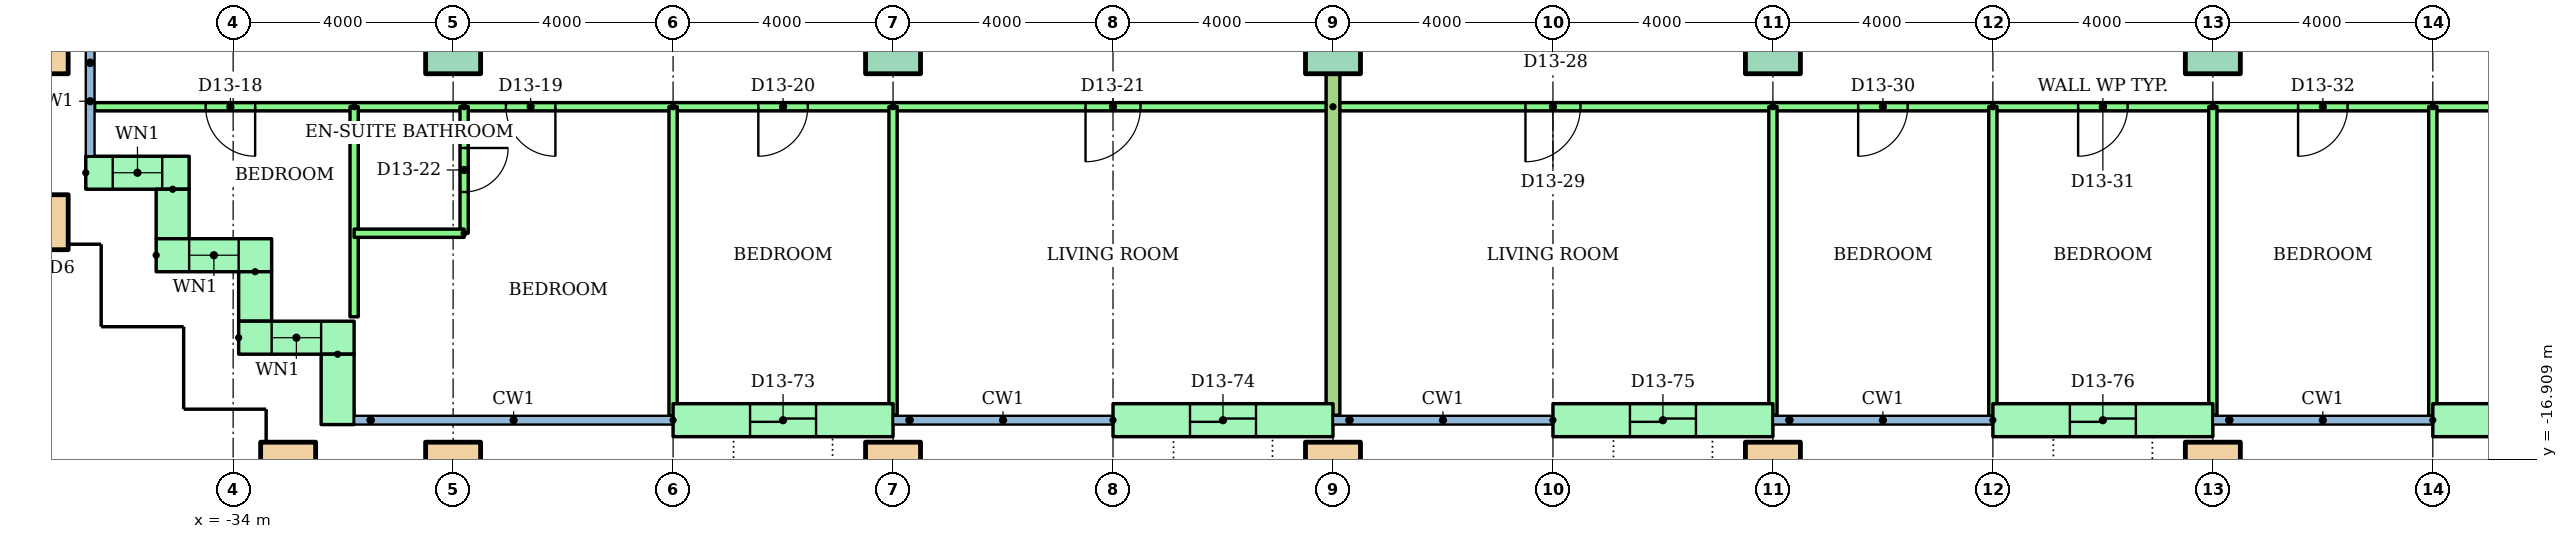
"""IFC4 building model, lengths in metres.
Left out: names, types, materials, properties, quantities, classifications, styles, units other than length and angle.
Written with IfcOpenShell. Run it as: python <this file> out.ifc"""

import sys

from ifc_helpers import new_model, si_unit, direction, frame, frame_2d, origin, origin_2d, place, context, subcontext, project, spatial, rectangle, hollow_rectangle, extrude, element, fill, save


model = new_model("IFC4")
c1 = context("Model", 3, precision=1e-05, world=origin(), true_north=direction((0.0, 1.0)))
c2 = subcontext(c1, "Body", "Model", "MODEL_VIEW")
j1 = project(units=[si_unit("LENGTHUNIT", "METRE"), si_unit("PLANEANGLEUNIT", "RADIAN")], contexts=[c1])
p1 = place(None, origin())
s1 = spatial("IfcSite", under=j1, at=p1, CompositionType="ELEMENT")
p2 = place(p1, origin())
s2 = spatial("IfcBuilding", under=s1, at=p2, CompositionType="ELEMENT")
p3 = place(p2, frame((0.0, 0.0, 51.2)))
s3 = spatial("IfcBuildingStorey", under=s2, at=p3, CompositionType="ELEMENT", Elevation=51.2)
for number, where in (
    (1, (-33.0, -17.1, 0.0)),
    (2, (-30.0, -17.1, 0.0)),
    (3, (-22.0, -17.1, 0.0)),
    (4, (-14.0, -17.1, 0.0)),
    (5, (-6.0, -17.1, 0.0)),
    (6, (2.0, -17.1, 0.0)),
    (7, (-37.5, -12.6, 0.0)),
    (8, (-37.5, -9.4, 0.0)),
):
    element("IfcColumn", number, at=place(p3, frame(where)), inside=s3, PredefinedType="COLUMN", context=c2, shape_type="SweptSolid", body=[
        extrude(hollow_rectangle(XDim=1.0, YDim=1.0, WallThickness=0.05, at=origin_2d()), origin(), (0.0, 0.0, 1.0), 3.2),
    ])
for number, where in (
    (9, (-30.0, -9.4, 0.0)),
    (10, (-22.0, -9.4, 0.0)),
    (11, (-14.0, -9.4, 0.0)),
    (12, (-6.0, -9.4, 0.0)),
    (13, (2.0, -9.4, 0.0)),
):
    element("IfcColumn", number, at=place(p3, frame(where)), inside=s3, PredefinedType="COLUMN", context=c2, shape_type="SweptSolid", body=[
        extrude(rectangle(XDim=1.0, YDim=1.0, at=origin_2d()), origin(), (0.0, 0.0, 1.0), 3.2),
    ])
p4 = place(p3, frame((-36.68, -11.7, 0.0)))
e14 = element("IfcWall", 14, at=p4, inside=s3, PredefinedType="STANDARD", context=c2, shape_type="SweptSolid", body=[
    extrude(rectangle(XDim=1.88, YDim=0.6, at=frame_2d((0.94, 0.0))), origin(), (0.0, 0.0, 1.0), 2.92),
])
p5 = place(p4, frame((0.49, 0.0, 0.9)))
e15 = element("IfcOpeningElement", 15, at=p5, cuts=e14, PredefinedType="OPENING", context=c2, shape_type="SweptSolid", body=[
    extrude(rectangle(XDim=0.9, YDim=1.5, at=frame_2d((0.45, 0.75))), frame((0.0, 0.31, 0.0), z_axis=(0.0, -1.0, 0.0), x_axis=(1.0, 0.0, 0.0)), (0.0, 0.0, 1.0), 0.62),
])
p6 = place(p3, frame((-35.1, -12.0, 0.0), z_axis=(0.0, 0.0, 1.0), x_axis=(0.0, -1.0, 0.0)))
e16 = element("IfcWall", 16, at=p6, inside=s3, PredefinedType="STANDARD", context=c2, shape_type="SweptSolid", body=[
    extrude(rectangle(XDim=0.9, YDim=0.6, at=frame_2d((0.45, 0.0))), origin(), (0.0, 0.0, 1.0), 2.92),
])
p7 = place(p3, frame((-35.4, -13.2, 0.0)))
e17 = element("IfcWall", 17, at=p7, inside=s3, PredefinedType="STANDARD", context=c2, shape_type="SweptSolid", body=[
    extrude(rectangle(XDim=2.1, YDim=0.6, at=frame_2d((1.05, 0.0))), origin(), (0.0, 0.0, 1.0), 2.92),
])
p8 = place(p7, frame((0.6, 0.0, 0.9)))
e18 = element("IfcOpeningElement", 18, at=p8, cuts=e17, PredefinedType="OPENING", context=c2, shape_type="SweptSolid", body=[
    extrude(rectangle(XDim=0.9, YDim=1.5, at=frame_2d((0.45, 0.75))), frame((0.0, 0.31, 0.0), z_axis=(0.0, -1.0, 0.0), x_axis=(1.0, 0.0, 0.0)), (0.0, 0.0, 1.0), 0.62),
])
p9 = place(p3, frame((-33.6, -13.5, 0.0), z_axis=(0.0, 0.0, 1.0), x_axis=(0.0, -1.0, 0.0)))
e19 = element("IfcWall", 19, at=p9, inside=s3, PredefinedType="STANDARD", context=c2, shape_type="SweptSolid", body=[
    extrude(rectangle(XDim=0.9, YDim=0.6, at=frame_2d((0.45, 0.0))), origin(), (0.0, 0.0, 1.0), 2.92),
])
p10 = place(p3, frame((-33.9, -14.7, 0.0)))
e20 = element("IfcWall", 20, at=p10, inside=s3, PredefinedType="STANDARD", context=c2, shape_type="SweptSolid", body=[
    extrude(rectangle(XDim=2.1, YDim=0.6, at=frame_2d((1.05, 0.0))), origin(), (0.0, 0.0, 1.0), 2.92),
])
p11 = place(p10, frame((0.6, 0.0, 0.9)))
e21 = element("IfcOpeningElement", 21, at=p11, cuts=e20, PredefinedType="OPENING", context=c2, shape_type="SweptSolid", body=[
    extrude(rectangle(XDim=0.9, YDim=1.5, at=frame_2d((0.45, 0.75))), frame((0.0, 0.31, 0.0), z_axis=(0.0, -1.0, 0.0), x_axis=(1.0, 0.0, 0.0)), (0.0, 0.0, 1.0), 0.62),
])
p12 = place(p3, frame((-32.1, -15.0, 0.0), z_axis=(0.0, 0.0, 1.0), x_axis=(0.0, -1.0, 0.0)))
e22 = element("IfcWall", 22, at=p12, inside=s3, PredefinedType="STANDARD", context=c2, shape_type="SweptSolid", body=[
    extrude(rectangle(XDim=1.28, YDim=0.6, at=frame_2d((0.64, 0.0))), origin(), (0.0, 0.0, 1.0), 2.92),
])
p13 = place(p3, frame((-26.0, -16.2, 0.0)))
e23 = element("IfcWall", 23, at=p13, inside=s3, PredefinedType="STANDARD", context=c2, shape_type="SweptSolid", body=[
    extrude(rectangle(XDim=4.0, YDim=0.6, at=frame_2d((2.0, 0.0))), origin(), (0.0, 0.0, 1.0), 2.92),
])
p14 = place(p13, frame((1.4, 0.0, 0.0)))
e24 = element("IfcOpeningElement", 24, at=p14, cuts=e23, PredefinedType="OPENING", context=c2, shape_type="SweptSolid", body=[
    extrude(rectangle(XDim=1.2, YDim=2.1, at=frame_2d((0.6, 1.05))), frame((0.0, 0.31, 0.0), z_axis=(0.0, -1.0, 0.0), x_axis=(1.0, 0.0, 0.0)), (0.0, 0.0, 1.0), 0.62),
])
p15 = place(p3, frame((-18.0, -16.2, 0.0)))
e25 = element("IfcWall", 25, at=p15, inside=s3, PredefinedType="STANDARD", context=c2, shape_type="SweptSolid", body=[
    extrude(rectangle(XDim=4.0, YDim=0.6, at=frame_2d((2.0, 0.0))), origin(), (0.0, 0.0, 1.0), 2.92),
])
p16 = place(p15, frame((1.4, 0.0, 0.0)))
e26 = element("IfcOpeningElement", 26, at=p16, cuts=e25, PredefinedType="OPENING", context=c2, shape_type="SweptSolid", body=[
    extrude(rectangle(XDim=1.2, YDim=2.1, at=frame_2d((0.6, 1.05))), frame((0.0, 0.31, 0.0), z_axis=(0.0, -1.0, 0.0), x_axis=(1.0, 0.0, 0.0)), (0.0, 0.0, 1.0), 0.62),
])
p17 = place(p3, frame((-10.0, -16.2, 0.0)))
e27 = element("IfcWall", 27, at=p17, inside=s3, PredefinedType="STANDARD", context=c2, shape_type="SweptSolid", body=[
    extrude(rectangle(XDim=4.0, YDim=0.6, at=frame_2d((2.0, 0.0))), origin(), (0.0, 0.0, 1.0), 2.92),
])
p18 = place(p17, frame((1.4, 0.0, 0.0)))
e28 = element("IfcOpeningElement", 28, at=p18, cuts=e27, PredefinedType="OPENING", context=c2, shape_type="SweptSolid", body=[
    extrude(rectangle(XDim=1.2, YDim=2.1, at=frame_2d((0.6, 1.05))), frame((0.0, 0.31, 0.0), z_axis=(0.0, -1.0, 0.0), x_axis=(1.0, 0.0, 0.0)), (0.0, 0.0, 1.0), 0.62),
])
p19 = place(p3, frame((-2.0, -16.2, 0.0)))
e29 = element("IfcWall", 29, at=p19, inside=s3, PredefinedType="STANDARD", context=c2, shape_type="SweptSolid", body=[
    extrude(rectangle(XDim=4.0, YDim=0.6, at=frame_2d((2.0, 0.0))), origin(), (0.0, 0.0, 1.0), 2.92),
])
p20 = place(p19, frame((1.4, 0.0, 0.0)))
e30 = element("IfcOpeningElement", 30, at=p20, cuts=e29, PredefinedType="OPENING", context=c2, shape_type="SweptSolid", body=[
    extrude(rectangle(XDim=1.2, YDim=2.1, at=frame_2d((0.6, 1.05))), frame((0.0, 0.31, 0.0), z_axis=(0.0, -1.0, 0.0), x_axis=(1.0, 0.0, 0.0)), (0.0, 0.0, 1.0), 0.62),
])
p21 = place(p3, frame((6.0, -16.2, 0.0)))
e31 = element("IfcWall", 31, at=p21, inside=s3, PredefinedType="STANDARD", context=c2, shape_type="SweptSolid", body=[
    extrude(rectangle(XDim=4.0, YDim=0.6, at=frame_2d((2.0, 0.0))), origin(), (0.0, 0.0, 1.0), 2.92),
])
p22 = place(p21, frame((1.4, 0.0, 0.0)))
e32 = element("IfcOpeningElement", 32, at=p22, cuts=e31, PredefinedType="OPENING", context=c2, shape_type="SweptSolid", body=[
    extrude(rectangle(XDim=1.2, YDim=2.1, at=frame_2d((0.6, 1.05))), frame((0.0, 0.31, 0.0), z_axis=(0.0, -1.0, 0.0), x_axis=(1.0, 0.0, 0.0)), (0.0, 0.0, 1.0), 0.62),
])
p23 = place(p3, frame((-14.0, -10.5, 0.0), z_axis=(0.0, 0.0, 1.0), x_axis=(-1.0, 0.0, 0.0)))
e33 = element("IfcWall", 33, at=p23, inside=s3, PredefinedType="PARTITIONING", context=c2, shape_type="SweptSolid", body=[
    extrude(rectangle(XDim=22.52, YDim=0.15, at=frame_2d((11.26, 0.0))), origin(), (0.0, 0.0, 1.0), 2.4),
])
p24 = place(p23, frame((19.6, 0.0, 0.0)))
e34 = element("IfcOpeningElement", 34, at=p24, cuts=e33, PredefinedType="OPENING", context=c2, shape_type="SweptSolid", body=[
    extrude(rectangle(XDim=0.9, YDim=2.1, at=frame_2d((0.45, 1.05))), frame((0.0, 0.085, 0.0), z_axis=(0.0, -1.0, 0.0), x_axis=(1.0, 0.0, 0.0)), (0.0, 0.0, 1.0), 0.17),
])
p25 = place(p23, frame((14.14, 0.0, 0.0)))
e35 = element("IfcOpeningElement", 35, at=p25, cuts=e33, PredefinedType="OPENING", context=c2, shape_type="SweptSolid", body=[
    extrude(rectangle(XDim=0.9, YDim=2.1, at=frame_2d((0.45, 1.05))), frame((0.0, 0.085, 0.0), z_axis=(0.0, -1.0, 0.0), x_axis=(1.0, 0.0, 0.0)), (0.0, 0.0, 1.0), 0.17),
])
p26 = place(p23, frame((9.55, 0.0, 0.0)))
e36 = element("IfcOpeningElement", 36, at=p26, cuts=e33, PredefinedType="OPENING", context=c2, shape_type="SweptSolid", body=[
    extrude(rectangle(XDim=0.9, YDim=2.1, at=frame_2d((0.45, 1.05))), frame((0.0, 0.085, 0.0), z_axis=(0.0, -1.0, 0.0), x_axis=(1.0, 0.0, 0.0)), (0.0, 0.0, 1.0), 0.17),
])
p27 = place(p23, frame((3.5, 0.0, 0.0)))
e37 = element("IfcOpeningElement", 37, at=p27, cuts=e33, PredefinedType="OPENING", context=c2, shape_type="SweptSolid", body=[
    extrude(rectangle(XDim=1.0, YDim=2.1, at=frame_2d((0.5, 1.05))), frame((0.0, 0.085, 0.0), z_axis=(0.0, -1.0, 0.0), x_axis=(1.0, 0.0, 0.0)), (0.0, 0.0, 1.0), 0.17),
])
p28 = place(p3, frame((-31.8, -10.5, 0.0), z_axis=(0.0, 0.0, 1.0), x_axis=(0.0, -1.0, 0.0)))
e38 = element("IfcWall", 38, at=p28, inside=s3, PredefinedType="PARTITIONING", context=c2, shape_type="SweptSolid", body=[
    extrude(rectangle(XDim=3.82, YDim=0.15, at=frame_2d((1.91, 0.0))), origin(), (0.0, 0.0, 1.0), 2.4),
])
p29 = place(p3, frame((-26.0, -10.5, 0.0), z_axis=(0.0, 0.0, 1.0), x_axis=(0.0, -1.0, 0.0)))
e39 = element("IfcWall", 39, at=p29, inside=s3, PredefinedType="PARTITIONING", context=c2, shape_type="SweptSolid", body=[
    extrude(rectangle(XDim=5.621, YDim=0.15, at=frame_2d((2.811, 0.0))), origin(), (0.0, 0.0, 1.0), 2.4),
])
p30 = place(p3, frame((-22.0, -10.5, 0.0), z_axis=(0.0, 0.0, 1.0), x_axis=(0.0, -1.0, 0.0)))
e40 = element("IfcWall", 40, at=p30, inside=s3, PredefinedType="PARTITIONING", context=c2, shape_type="SweptSolid", body=[
    extrude(rectangle(XDim=5.61, YDim=0.15, at=frame_2d((2.805, 0.0))), origin(), (0.0, 0.0, 1.0), 2.4),
])
p31 = place(p3, frame((-29.8, -10.5, 0.0), z_axis=(0.0, 0.0, 1.0), x_axis=(0.0, -1.0, 0.0)))
e41 = element("IfcWall", 41, at=p31, inside=s3, PredefinedType="PARTITIONING", context=c2, shape_type="SweptSolid", body=[
    extrude(rectangle(XDim=2.3, YDim=0.15, at=frame_2d((1.15, 0.0))), origin(), (0.0, 0.0, 1.0), 2.4),
])
p32 = place(p31, frame((0.75, 0.0, 0.0)))
e42 = element("IfcOpeningElement", 42, at=p32, cuts=e41, PredefinedType="OPENING", context=c2, shape_type="SweptSolid", body=[
    extrude(rectangle(XDim=0.8, YDim=2.1, at=frame_2d((0.4, 1.05))), frame((0.0, 0.085, 0.0), z_axis=(0.0, -1.0, 0.0), x_axis=(1.0, 0.0, 0.0)), (0.0, 0.0, 1.0), 0.17),
])
p33 = place(p3, frame((-29.8, -12.8, 0.0), z_axis=(0.0, 0.0, 1.0), x_axis=(-1.0, 0.0, 0.0)))
e43 = element("IfcWall", 43, at=p33, inside=s3, PredefinedType="PARTITIONING", context=c2, shape_type="SweptSolid", body=[
    extrude(rectangle(XDim=2.0, YDim=0.15, at=frame_2d((1.0, 0.0))), origin(), (0.0, 0.0, 1.0), 2.4),
])
p34 = place(p3, frame((10.0, -10.5, 0.0), z_axis=(0.0, 0.0, 1.0), x_axis=(-1.0, 0.0, 0.0)))
e44 = element("IfcWall", 44, at=p34, inside=s3, PredefinedType="PARTITIONING", context=c2, shape_type="SweptSolid", body=[
    extrude(rectangle(XDim=24.0, YDim=0.15, at=frame_2d((12.0, 0.0))), origin(), (0.0, 0.0, 1.0), 2.4),
])
p35 = place(p34, frame((19.5, 0.0, 0.0)))
e45 = element("IfcOpeningElement", 45, at=p35, cuts=e44, PredefinedType="OPENING", context=c2, shape_type="SweptSolid", body=[
    extrude(rectangle(XDim=1.0, YDim=2.1, at=frame_2d((0.5, 1.05))), frame((0.0, 0.085, 0.0), z_axis=(0.0, -1.0, 0.0), x_axis=(1.0, 0.0, 0.0)), (0.0, 0.0, 1.0), 0.17),
])
p36 = place(p34, frame((13.55, 0.0, 0.0)))
e46 = element("IfcOpeningElement", 46, at=p36, cuts=e44, PredefinedType="OPENING", context=c2, shape_type="SweptSolid", body=[
    extrude(rectangle(XDim=0.9, YDim=2.1, at=frame_2d((0.45, 1.05))), frame((0.0, 0.085, 0.0), z_axis=(0.0, -1.0, 0.0), x_axis=(1.0, 0.0, 0.0)), (0.0, 0.0, 1.0), 0.17),
])
p37 = place(p34, frame((9.55, 0.0, 0.0)))
e47 = element("IfcOpeningElement", 47, at=p37, cuts=e44, PredefinedType="OPENING", context=c2, shape_type="SweptSolid", body=[
    extrude(rectangle(XDim=0.9, YDim=2.1, at=frame_2d((0.45, 1.05))), frame((0.0, 0.085, 0.0), z_axis=(0.0, -1.0, 0.0), x_axis=(1.0, 0.0, 0.0)), (0.0, 0.0, 1.0), 0.17),
])
p38 = place(p34, frame((5.55, 0.0, 0.0)))
e48 = element("IfcOpeningElement", 48, at=p38, cuts=e44, PredefinedType="OPENING", context=c2, shape_type="SweptSolid", body=[
    extrude(rectangle(XDim=0.9, YDim=2.1, at=frame_2d((0.45, 1.05))), frame((0.0, 0.085, 0.0), z_axis=(0.0, -1.0, 0.0), x_axis=(1.0, 0.0, 0.0)), (0.0, 0.0, 1.0), 0.17),
])
p39 = place(p34, frame((1.55, 0.0, 0.0)))
e49 = element("IfcOpeningElement", 49, at=p39, cuts=e44, PredefinedType="OPENING", context=c2, shape_type="SweptSolid", body=[
    extrude(rectangle(XDim=0.9, YDim=2.1, at=frame_2d((0.45, 1.05))), frame((0.0, 0.085, 0.0), z_axis=(0.0, -1.0, 0.0), x_axis=(1.0, 0.0, 0.0)), (0.0, 0.0, 1.0), 0.17),
])
p40 = place(p3, frame((-6.0, -10.5, 0.0), z_axis=(0.0, 0.0, 1.0), x_axis=(0.0, -1.0, 0.0)))
e50 = element("IfcWall", 50, at=p40, inside=s3, PredefinedType="PARTITIONING", context=c2, shape_type="SweptSolid", body=[
    extrude(rectangle(XDim=5.61, YDim=0.15, at=frame_2d((2.805, 0.0))), origin(), (0.0, 0.0, 1.0), 2.4),
])
p41 = place(p3, frame((-2.0, -10.5, 0.0), z_axis=(0.0, 0.0, 1.0), x_axis=(0.0, -1.0, 0.0)))
e51 = element("IfcWall", 51, at=p41, inside=s3, PredefinedType="PARTITIONING", context=c2, shape_type="SweptSolid", body=[
    extrude(rectangle(XDim=5.621, YDim=0.15, at=frame_2d((2.811, 0.0))), origin(), (0.0, 0.0, 1.0), 2.4),
])
p42 = place(p3, frame((2.0, -10.5, 0.0), z_axis=(0.0, 0.0, 1.0), x_axis=(0.0, -1.0, 0.0)))
e52 = element("IfcWall", 52, at=p42, inside=s3, PredefinedType="PARTITIONING", context=c2, shape_type="SweptSolid", body=[
    extrude(rectangle(XDim=5.61, YDim=0.15, at=frame_2d((2.805, 0.0))), origin(), (0.0, 0.0, 1.0), 2.4),
])
p43 = place(p3, frame((6.0, -10.5, 0.0), z_axis=(0.0, 0.0, 1.0), x_axis=(0.0, -1.0, 0.0)))
e53 = element("IfcWall", 53, at=p43, inside=s3, PredefinedType="PARTITIONING", context=c2, shape_type="SweptSolid", body=[
    extrude(rectangle(XDim=5.621, YDim=0.15, at=frame_2d((2.811, 0.0))), origin(), (0.0, 0.0, 1.0), 2.4),
])
p44 = place(p3, frame((-14.0, -1.4, 0.0), z_axis=(0.0, 0.0, 1.0), x_axis=(0.0, -1.0, 0.0)))
e54 = element("IfcWall", 54, at=p44, inside=s3, PredefinedType="PARTITIONING", context=c2, shape_type="SweptSolid", body=[
    extrude(rectangle(XDim=14.71, YDim=0.25, at=frame_2d((7.355, 0.0))), origin(), (0.0, 0.0, 1.0), 2.4),
])
p45 = place(p5, origin())
e55 = element("IfcWindow", 55, at=p45, inside=s3, PartitioningType="SINGLE_PANEL", PredefinedType="WINDOW", context=c2, shape_type="SweptSolid", body=[
    extrude(rectangle(XDim=0.9, YDim=1.5, at=frame_2d((0.45, 0.75))), frame((0.0, 0.03, 0.0), z_axis=(0.0, -1.0, 0.0), x_axis=(1.0, 0.0, 0.0)), (0.0, 0.0, 1.0), 0.06),
])
fill(e15, e55)
p46 = place(p8, origin())
e56 = element("IfcWindow", 56, at=p46, inside=s3, PartitioningType="SINGLE_PANEL", PredefinedType="WINDOW", context=c2, shape_type="SweptSolid", body=[
    extrude(rectangle(XDim=0.9, YDim=1.5, at=frame_2d((0.45, 0.75))), frame((0.0, 0.03, 0.0), z_axis=(0.0, -1.0, 0.0), x_axis=(1.0, 0.0, 0.0)), (0.0, 0.0, 1.0), 0.06),
])
fill(e18, e56)
p47 = place(p11, origin())
e57 = element("IfcWindow", 57, at=p47, inside=s3, PartitioningType="SINGLE_PANEL", PredefinedType="WINDOW", context=c2, shape_type="SweptSolid", body=[
    extrude(rectangle(XDim=0.9, YDim=1.5, at=frame_2d((0.45, 0.75))), frame((0.0, 0.03, 0.0), z_axis=(0.0, -1.0, 0.0), x_axis=(1.0, 0.0, 0.0)), (0.0, 0.0, 1.0), 0.06),
])
fill(e21, e57)
p48 = place(p24, origin())
e58 = element("IfcDoor", 58, at=p48, inside=s3, OperationType="SINGLE_SWING_LEFT", PredefinedType="DOOR", context=c2, shape_type="SweptSolid", body=[
    extrude(rectangle(XDim=0.9, YDim=2.1, at=frame_2d((0.45, 1.05))), frame((0.0, 0.025, 0.0), z_axis=(0.0, -1.0, 0.0), x_axis=(1.0, 0.0, 0.0)), (0.0, 0.0, 1.0), 0.05),
])
fill(e34, e58)
p49 = place(p25, origin())
e59 = element("IfcDoor", 59, at=p49, inside=s3, OperationType="SINGLE_SWING_LEFT", PredefinedType="DOOR", context=c2, shape_type="SweptSolid", body=[
    extrude(rectangle(XDim=0.9, YDim=2.1, at=frame_2d((0.45, 1.05))), frame((0.0, 0.025, 0.0), z_axis=(0.0, -1.0, 0.0), x_axis=(1.0, 0.0, 0.0)), (0.0, 0.0, 1.0), 0.05),
])
fill(e35, e59)
p50 = place(p26, origin())
e60 = element("IfcDoor", 60, at=p50, inside=s3, OperationType="SINGLE_SWING_RIGHT", PredefinedType="DOOR", context=c2, shape_type="SweptSolid", body=[
    extrude(rectangle(XDim=0.9, YDim=2.1, at=frame_2d((0.45, 1.05))), frame((0.0, 0.025, 0.0), z_axis=(0.0, -1.0, 0.0), x_axis=(1.0, 0.0, 0.0)), (0.0, 0.0, 1.0), 0.05),
])
fill(e36, e60)
p51 = place(p27, origin())
e61 = element("IfcDoor", 61, at=p51, inside=s3, OperationType="SINGLE_SWING_RIGHT", PredefinedType="DOOR", context=c2, shape_type="SweptSolid", body=[
    extrude(rectangle(XDim=1.0, YDim=2.1, at=frame_2d((0.5, 1.05))), frame((0.0, 0.025, 0.0), z_axis=(0.0, -1.0, 0.0), x_axis=(1.0, 0.0, 0.0)), (0.0, 0.0, 1.0), 0.05),
])
fill(e37, e61)
p52 = place(p32, origin())
e62 = element("IfcDoor", 62, at=p52, inside=s3, OperationType="SINGLE_SWING_LEFT", PredefinedType="DOOR", context=c2, shape_type="SweptSolid", body=[
    extrude(rectangle(XDim=0.8, YDim=2.1, at=frame_2d((0.4, 1.05))), frame((0.0, 0.025, 0.0), z_axis=(0.0, -1.0, 0.0), x_axis=(1.0, 0.0, 0.0)), (0.0, 0.0, 1.0), 0.05),
])
fill(e42, e62)
p53 = place(p35, origin())
e63 = element("IfcDoor", 63, at=p53, inside=s3, OperationType="SINGLE_SWING_RIGHT", PredefinedType="DOOR", context=c2, shape_type="SweptSolid", body=[
    extrude(rectangle(XDim=1.0, YDim=2.1, at=frame_2d((0.5, 1.05))), frame((0.0, 0.025, 0.0), z_axis=(0.0, -1.0, 0.0), x_axis=(1.0, 0.0, 0.0)), (0.0, 0.0, 1.0), 0.05),
])
fill(e45, e63)
p54 = place(p36, origin())
e64 = element("IfcDoor", 64, at=p54, inside=s3, OperationType="SINGLE_SWING_RIGHT", PredefinedType="DOOR", context=c2, shape_type="SweptSolid", body=[
    extrude(rectangle(XDim=0.9, YDim=2.1, at=frame_2d((0.45, 1.05))), frame((0.0, 0.025, 0.0), z_axis=(0.0, -1.0, 0.0), x_axis=(1.0, 0.0, 0.0)), (0.0, 0.0, 1.0), 0.05),
])
fill(e46, e64)
p55 = place(p37, origin())
e65 = element("IfcDoor", 65, at=p55, inside=s3, OperationType="SINGLE_SWING_RIGHT", PredefinedType="DOOR", context=c2, shape_type="SweptSolid", body=[
    extrude(rectangle(XDim=0.9, YDim=2.1, at=frame_2d((0.45, 1.05))), frame((0.0, 0.025, 0.0), z_axis=(0.0, -1.0, 0.0), x_axis=(1.0, 0.0, 0.0)), (0.0, 0.0, 1.0), 0.05),
])
fill(e47, e65)
p56 = place(p38, origin())
e66 = element("IfcDoor", 66, at=p56, inside=s3, OperationType="SINGLE_SWING_RIGHT", PredefinedType="DOOR", context=c2, shape_type="SweptSolid", body=[
    extrude(rectangle(XDim=0.9, YDim=2.1, at=frame_2d((0.45, 1.05))), frame((0.0, 0.025, 0.0), z_axis=(0.0, -1.0, 0.0), x_axis=(1.0, 0.0, 0.0)), (0.0, 0.0, 1.0), 0.05),
])
fill(e48, e66)
p57 = place(p14, origin())
e67 = element("IfcDoor", 67, at=p57, inside=s3, OperationType="SLIDING_TO_LEFT", PredefinedType="DOOR", context=c2, shape_type="SweptSolid", body=[
    extrude(rectangle(XDim=1.2, YDim=2.1, at=frame_2d((0.6, 1.05))), frame((0.0, 0.025, 0.0), z_axis=(0.0, -1.0, 0.0), x_axis=(1.0, 0.0, 0.0)), (0.0, 0.0, 1.0), 0.05),
])
fill(e24, e67)
p58 = place(p16, origin())
e68 = element("IfcDoor", 68, at=p58, inside=s3, OperationType="SLIDING_TO_LEFT", PredefinedType="DOOR", context=c2, shape_type="SweptSolid", body=[
    extrude(rectangle(XDim=1.2, YDim=2.1, at=frame_2d((0.6, 1.05))), frame((0.0, 0.025, 0.0), z_axis=(0.0, -1.0, 0.0), x_axis=(1.0, 0.0, 0.0)), (0.0, 0.0, 1.0), 0.05),
])
fill(e26, e68)
p59 = place(p18, origin())
e69 = element("IfcDoor", 69, at=p59, inside=s3, OperationType="SLIDING_TO_LEFT", PredefinedType="DOOR", context=c2, shape_type="SweptSolid", body=[
    extrude(rectangle(XDim=1.2, YDim=2.1, at=frame_2d((0.6, 1.05))), frame((0.0, 0.025, 0.0), z_axis=(0.0, -1.0, 0.0), x_axis=(1.0, 0.0, 0.0)), (0.0, 0.0, 1.0), 0.05),
])
fill(e28, e69)
p60 = place(p20, origin())
e70 = element("IfcDoor", 70, at=p60, inside=s3, OperationType="SLIDING_TO_LEFT", PredefinedType="DOOR", context=c2, shape_type="SweptSolid", body=[
    extrude(rectangle(XDim=1.2, YDim=2.1, at=frame_2d((0.6, 1.05))), frame((0.0, 0.025, 0.0), z_axis=(0.0, -1.0, 0.0), x_axis=(1.0, 0.0, 0.0)), (0.0, 0.0, 1.0), 0.05),
])
fill(e30, e70)
save(model, sys.argv[1])
